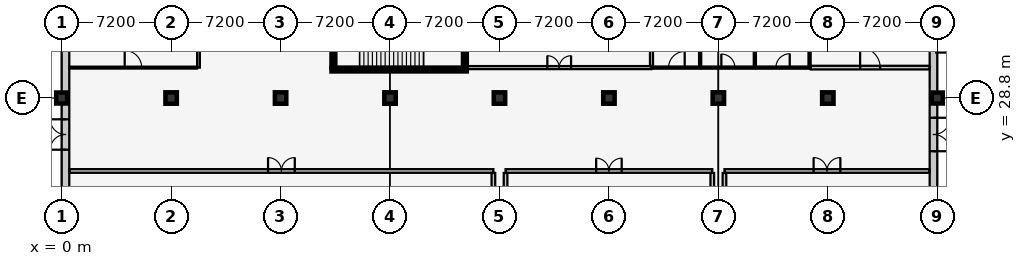
"""IFC4 building model, lengths in metres.
Left out: names, types, materials, properties, quantities, classifications, styles, units other than length and angle.
Written with IfcOpenShell. Run it as: python <this file> out.ifc"""

import sys

from ifc_helpers import new_model, si_unit, direction, frame, frame_2d, origin, origin_2d, place, context, subcontext, project, spatial, rectangle, extrude, element, fill, save


model = new_model("IFC4")
c1 = context("Model", 3, precision=1e-05, world=origin(), true_north=direction((0.0, 1.0)))
c2 = subcontext(c1, "Body", "Model", "MODEL_VIEW")
j1 = project(units=[si_unit("LENGTHUNIT", "METRE"), si_unit("PLANEANGLEUNIT", "RADIAN")], contexts=[c1])
p1 = place(None, origin())
s1 = spatial("IfcSite", under=j1, at=p1, CompositionType="ELEMENT")
p2 = place(p1, origin())
s2 = spatial("IfcBuilding", under=s1, at=p2, CompositionType="ELEMENT")
p3 = place(p2, origin())
s3 = spatial("IfcBuildingStorey", under=s2, at=p3, CompositionType="ELEMENT", Elevation=0.0)
p4 = place(p3, frame((0.0, 28.8, 0.0), z_axis=(0.0, 0.0, 1.0), x_axis=(1.0, 0.0, 0.0)))
e1 = element("IfcColumn", 1, at=p4, inside=s3, PredefinedType="COLUMN", context=c2, shape_type="SweptSolid", body=[
    extrude(rectangle(XDim=0.72, YDim=0.72, at=origin_2d()), origin(), (0.0, 0.0, 1.0), 5.4),
])
for number, where, z_axis, x_axis in (
    (2, (7.2, 28.8, 0.0), (0.0, 0.0, 1.0), (1.0, 0.0, 0.0)),
    (3, (14.4, 28.8, 0.0), (0.0, 0.0, 1.0), (1.0, 0.0, 0.0)),
    (4, (21.6, 28.8, 0.0), (0.0, 0.0, 1.0), (1.0, 0.0, 0.0)),
    (5, (28.8, 28.8, 0.0), (0.0, 0.0, 1.0), (1.0, 0.0, 0.0)),
    (6, (36.0, 28.8, 0.0), (0.0, 0.0, 1.0), (1.0, 0.0, 0.0)),
    (7, (43.2, 28.8, 0.0), (0.0, 0.0, 1.0), (1.0, 0.0, 0.0)),
    (8, (50.4, 28.8, 0.0), (0.0, 0.0, 1.0), (1.0, 0.0, 0.0)),
):
    element("IfcColumn", number, at=place(p3, frame(where, z_axis=z_axis, x_axis=x_axis)), inside=s3, PredefinedType="COLUMN", context=c2, shape_type="SweptSolid", body=[
        extrude(rectangle(XDim=0.75, YDim=0.75, at=origin_2d()), origin(), (0.0, 0.0, 1.0), 5.4),
    ])
p5 = place(p3, frame((57.6, 28.8, 0.0), z_axis=(0.0, 0.0, 1.0), x_axis=(1.0, 0.0, 0.0)))
e9 = element("IfcColumn", 9, at=p5, inside=s3, PredefinedType="COLUMN", context=c2, shape_type="SweptSolid", body=[
    extrude(rectangle(XDim=0.72, YDim=0.72, at=origin_2d()), origin(), (0.0, 0.0, 1.0), 5.4),
])
p6 = place(p3, frame((57.35, 38.4, 0.0), z_axis=(0.0, 0.0, 1.0), x_axis=(0.0, -1.0, 0.0)))
e10 = element("IfcWall", 10, at=p6, inside=s3, PredefinedType="SOLIDWALL", context=c2, shape_type="SweptSolid", body=[
    extrude(rectangle(XDim=38.4, YDim=0.5, at=frame_2d((19.2, 0.0))), origin(), (0.0, 0.0, 1.0), 4.255),
])
p7 = place(p6, frame((10.9, 0.0, 0.0)))
e11 = element("IfcOpeningElement", 11, at=p7, cuts=e10, PredefinedType="OPENING", context=c2, shape_type="SweptSolid", body=[
    extrude(rectangle(XDim=2.2, YDim=2.4, at=frame_2d((1.1, 1.2))), frame((0.0, 0.262, 0.0), z_axis=(0.0, -1.0, 0.0), x_axis=(1.0, 0.0, 0.0)), (0.0, 0.0, 1.0), 0.524),
])
p8 = place(p6, frame((1.345, 0.0, 0.9)))
e12 = element("IfcOpeningElement", 12, at=p8, cuts=e10, PredefinedType="OPENING", context=c2, shape_type="SweptSolid", body=[
    extrude(rectangle(XDim=1.15, YDim=1.45, at=frame_2d((0.575, 0.725))), frame((0.0, 0.262, 0.0), z_axis=(0.0, -1.0, 0.0), x_axis=(1.0, 0.0, 0.0)), (0.0, 0.0, 1.0), 0.524),
])
p9 = place(p6, frame((5.135, 0.0, 0.9)))
e13 = element("IfcOpeningElement", 13, at=p9, cuts=e10, PredefinedType="OPENING", context=c2, shape_type="SweptSolid", body=[
    extrude(rectangle(XDim=1.25, YDim=1.45, at=frame_2d((0.625, 0.725))), frame((0.0, 0.262, 0.0), z_axis=(0.0, -1.0, 0.0), x_axis=(1.0, 0.0, 0.0)), (0.0, 0.0, 1.0), 0.524),
])
p10 = place(p6, frame((20.595, 0.0, 0.9)))
e14 = element("IfcOpeningElement", 14, at=p10, cuts=e10, PredefinedType="OPENING", context=c2, shape_type="SweptSolid", body=[
    extrude(rectangle(XDim=1.05, YDim=1.6, at=frame_2d((0.525, 0.8))), frame((0.0, 0.262, 0.0), z_axis=(0.0, -1.0, 0.0), x_axis=(1.0, 0.0, 0.0)), (0.0, 0.0, 1.0), 0.524),
])
p11 = place(p6, frame((28.175, 0.0, 0.9)))
e15 = element("IfcOpeningElement", 15, at=p11, cuts=e10, PredefinedType="OPENING", context=c2, shape_type="SweptSolid", body=[
    extrude(rectangle(XDim=1.25, YDim=1.6, at=frame_2d((0.625, 0.8))), frame((0.0, 0.262, 0.0), z_axis=(0.0, -1.0, 0.0), x_axis=(1.0, 0.0, 0.0)), (0.0, 0.0, 1.0), 0.524),
])
p12 = place(p6, frame((35.73, 0.0, 0.9)))
e16 = element("IfcOpeningElement", 16, at=p12, cuts=e10, PredefinedType="OPENING", context=c2, shape_type="SweptSolid", body=[
    extrude(rectangle(XDim=1.5, YDim=1.6, at=frame_2d((0.75, 0.8))), frame((0.0, 0.262, 0.0), z_axis=(0.0, -1.0, 0.0), x_axis=(1.0, 0.0, 0.0)), (0.0, 0.0, 1.0), 0.524),
])
p13 = place(p3, frame((0.25, 0.0, 0.0), z_axis=(0.0, 0.0, 1.0), x_axis=(0.0, 1.0, 0.0)))
e17 = element("IfcWall", 17, at=p13, inside=s3, PredefinedType="SOLIDWALL", context=c2, shape_type="SweptSolid", body=[
    extrude(rectangle(XDim=38.4, YDim=0.5, at=frame_2d((19.2, 0.0))), origin(), (0.0, 0.0, 1.0), 4.255),
])
p14 = place(p13, frame((25.4, 0.0, 0.0)))
e18 = element("IfcOpeningElement", 18, at=p14, cuts=e17, PredefinedType="OPENING", context=c2, shape_type="SweptSolid", body=[
    extrude(rectangle(XDim=2.0, YDim=2.35, at=frame_2d((1.0, 1.175))), frame((0.0, 0.262, 0.0), z_axis=(0.0, -1.0, 0.0), x_axis=(1.0, 0.0, 0.0)), (0.0, 0.0, 1.0), 0.524),
])
p15 = place(p13, frame((1.245, 0.0, 0.9)))
e19 = element("IfcOpeningElement", 19, at=p15, cuts=e17, PredefinedType="OPENING", context=c2, shape_type="SweptSolid", body=[
    extrude(rectangle(XDim=1.35, YDim=1.45, at=frame_2d((0.675, 0.725))), frame((0.0, 0.262, 0.0), z_axis=(0.0, -1.0, 0.0), x_axis=(1.0, 0.0, 0.0)), (0.0, 0.0, 1.0), 0.524),
])
p16 = place(p13, frame((9.15, 0.0, 0.9)))
e20 = element("IfcOpeningElement", 20, at=p16, cuts=e17, PredefinedType="OPENING", context=c2, shape_type="SweptSolid", body=[
    extrude(rectangle(XDim=0.9, YDim=1.6, at=frame_2d((0.45, 0.8))), frame((0.0, 0.262, 0.0), z_axis=(0.0, -1.0, 0.0), x_axis=(1.0, 0.0, 0.0)), (0.0, 0.0, 1.0), 0.524),
])
p17 = place(p13, frame((16.705, 0.0, 0.9)))
e21 = element("IfcOpeningElement", 21, at=p17, cuts=e17, PredefinedType="OPENING", context=c2, shape_type="SweptSolid", body=[
    extrude(rectangle(XDim=1.15, YDim=1.6, at=frame_2d((0.575, 0.8))), frame((0.0, 0.262, 0.0), z_axis=(0.0, -1.0, 0.0), x_axis=(1.0, 0.0, 0.0)), (0.0, 0.0, 1.0), 0.524),
])
p18 = place(p13, frame((32.14, 0.0, 0.9)))
e22 = element("IfcOpeningElement", 22, at=p18, cuts=e17, PredefinedType="OPENING", context=c2, shape_type="SweptSolid", body=[
    extrude(rectangle(XDim=1.0, YDim=1.75, at=frame_2d((0.5, 0.875))), frame((0.0, 0.262, 0.0), z_axis=(0.0, -1.0, 0.0), x_axis=(1.0, 0.0, 0.0)), (0.0, 0.0, 1.0), 0.524),
])
p19 = place(p13, frame((35.92, 0.0, 0.9)))
e23 = element("IfcOpeningElement", 23, at=p19, cuts=e17, PredefinedType="OPENING", context=c2, shape_type="SweptSolid", body=[
    extrude(rectangle(XDim=1.12, YDim=1.75, at=frame_2d((0.56, 0.875))), frame((0.0, 0.262, 0.0), z_axis=(0.0, -1.0, 0.0), x_axis=(1.0, 0.0, 0.0)), (0.0, 0.0, 1.0), 0.524),
])
p20 = place(p3, frame((17.75, 30.675, 0.0), z_axis=(0.0, 0.0, 1.0), x_axis=(1.0, 0.0, 0.0)))
e24 = element("IfcWall", 24, at=p20, inside=s3, PredefinedType="SHEAR", context=c2, shape_type="SweptSolid", body=[
    extrude(rectangle(XDim=8.9, YDim=0.25, at=frame_2d((4.45, 0.0))), origin(), (0.0, 0.0, 1.0), 5.1),
])
p21 = place(p3, frame((17.875, 34.25, 0.0), z_axis=(0.0, 0.0, 1.0), x_axis=(0.0, -1.0, 0.0)))
e25 = element("IfcWall", 25, at=p21, inside=s3, PredefinedType="SHEAR", context=c2, shape_type="SweptSolid", body=[
    extrude(rectangle(XDim=3.45, YDim=0.25, at=frame_2d((1.725, 0.0))), origin(), (0.0, 0.0, 1.0), 5.1),
])
p22 = place(p21, frame((1.125, 0.0, 0.0)))
e26 = element("IfcOpeningElement", 26, at=p22, cuts=e25, PredefinedType="OPENING", context=c2, shape_type="SweptSolid", body=[
    extrude(rectangle(XDim=1.2, YDim=2.15, at=frame_2d((0.6, 1.075))), frame((0.0, 0.137, 0.0), z_axis=(0.0, -1.0, 0.0), x_axis=(1.0, 0.0, 0.0)), (0.0, 0.0, 1.0), 0.274),
])
p23 = place(p3, frame((26.525, 30.8, 0.0), z_axis=(0.0, 0.0, 1.0), x_axis=(0.0, 1.0, 0.0)))
e27 = element("IfcWall", 27, at=p23, inside=s3, PredefinedType="SHEAR", context=c2, shape_type="SweptSolid", body=[
    extrude(rectangle(XDim=3.45, YDim=0.25, at=frame_2d((1.725, 0.0))), origin(), (0.0, 0.0, 1.0), 5.1),
])
p24 = place(p3, frame((0.51, 24.0, 0.0), z_axis=(0.0, 0.0, 1.0), x_axis=(1.0, 0.0, 0.0)))
e28 = element("IfcWall", 28, at=p24, inside=s3, PredefinedType="PARTITIONING", context=c2, shape_type="SweptSolid", body=[
    extrude(rectangle(XDim=27.89, YDim=0.24, at=frame_2d((13.945, 0.0))), origin(), (0.0, 0.0, 1.0), 5.15),
])
p25 = place(p24, frame((13.065, 0.0, 0.0)))
e29 = element("IfcOpeningElement", 29, at=p25, cuts=e28, PredefinedType="OPENING", context=c2, shape_type="SweptSolid", body=[
    extrude(rectangle(XDim=1.76, YDim=2.3, at=frame_2d((0.88, 1.15))), frame((0.0, 0.132, 0.0), z_axis=(0.0, -1.0, 0.0), x_axis=(1.0, 0.0, 0.0)), (0.0, 0.0, 1.0), 0.264),
])
p26 = place(p3, frame((28.4, 0.47, 0.0), z_axis=(0.0, 0.0, 1.0), x_axis=(0.0, 1.0, 0.0)))
e30 = element("IfcWall", 30, at=p26, inside=s3, PredefinedType="PARTITIONING", context=c2, shape_type="SweptSolid", body=[
    extrude(rectangle(XDim=23.4, YDim=0.24, at=frame_2d((11.7, 0.0))), origin(), (0.0, 0.0, 1.0), 5.15),
])
p27 = place(p3, frame((29.2, 24.0, 0.0), z_axis=(0.0, 0.0, 1.0), x_axis=(1.0, 0.0, 0.0)))
e31 = element("IfcWall", 31, at=p27, inside=s3, PredefinedType="PARTITIONING", context=c2, shape_type="SweptSolid", body=[
    extrude(rectangle(XDim=13.6, YDim=0.24, at=frame_2d((6.8, 0.0))), origin(), (0.0, 0.0, 1.0), 5.15),
])
p28 = place(p27, frame((5.96, 0.0, 0.0)))
e32 = element("IfcOpeningElement", 32, at=p28, cuts=e31, PredefinedType="OPENING", context=c2, shape_type="SweptSolid", body=[
    extrude(rectangle(XDim=1.68, YDim=2.3, at=frame_2d((0.84, 1.15))), frame((0.0, 0.132, 0.0), z_axis=(0.0, -1.0, 0.0), x_axis=(1.0, 0.0, 0.0)), (0.0, 0.0, 1.0), 0.264),
])
for number, where, z_axis, x_axis in (
    (33, (29.2, 0.47, 0.0), (0.0, 0.0, 1.0), (0.0, 1.0, 0.0)),
    (34, (42.8, 0.47, 0.0), (0.0, 0.0, 1.0), (0.0, 1.0, 0.0)),
):
    element("IfcWall", number, at=place(p3, frame(where, z_axis=z_axis, x_axis=x_axis)), inside=s3, PredefinedType="PARTITIONING", context=c2, shape_type="SweptSolid", body=[
        extrude(rectangle(XDim=23.4, YDim=0.24, at=frame_2d((11.7, 0.0))), origin(), (0.0, 0.0, 1.0), 5.15),
    ])
p29 = place(p3, frame((43.6, 24.0, 0.0), z_axis=(0.0, 0.0, 1.0), x_axis=(1.0, 0.0, 0.0)))
e35 = element("IfcWall", 35, at=p29, inside=s3, PredefinedType="PARTITIONING", context=c2, shape_type="SweptSolid", body=[
    extrude(rectangle(XDim=13.49, YDim=0.24, at=frame_2d((6.745, 0.0))), origin(), (0.0, 0.0, 1.0), 5.15),
])
p30 = place(p29, frame((5.865, 0.0, 0.0)))
e36 = element("IfcOpeningElement", 36, at=p30, cuts=e35, PredefinedType="OPENING", context=c2, shape_type="SweptSolid", body=[
    extrude(rectangle(XDim=1.76, YDim=2.3, at=frame_2d((0.88, 1.15))), frame((0.0, 0.132, 0.0), z_axis=(0.0, -1.0, 0.0), x_axis=(1.0, 0.0, 0.0)), (0.0, 0.0, 1.0), 0.264),
])
p31 = place(p3, frame((43.6, 16.11, 0.0), z_axis=(0.0, 0.0, 1.0), x_axis=(0.0, 1.0, 0.0)))
e37 = element("IfcWall", 37, at=p31, inside=s3, PredefinedType="PARTITIONING", context=c2, shape_type="SweptSolid", body=[
    extrude(rectangle(XDim=7.76, YDim=0.24, at=frame_2d((3.88, 0.0))), origin(), (0.0, 0.0, 1.0), 5.15),
])
p32 = place(p3, frame((9.0, 30.8, 0.0), z_axis=(0.0, 0.0, 1.0), x_axis=(0.0, 1.0, 0.0)))
e38 = element("IfcWall", 38, at=p32, inside=s3, PredefinedType="PARTITIONING", context=c2, shape_type="SweptSolid", body=[
    extrude(rectangle(XDim=7.09, YDim=0.18, at=frame_2d((3.545, 0.0))), origin(), (0.0, 0.0, 1.0), 5.1),
])
p33 = place(p3, frame((0.51, 30.8, 0.0), z_axis=(0.0, 0.0, 1.0), x_axis=(1.0, 0.0, 0.0)))
e39 = element("IfcWall", 39, at=p33, inside=s3, PredefinedType="PARTITIONING", context=c2, shape_type="SweptSolid", body=[
    extrude(rectangle(XDim=8.39, YDim=0.125, at=frame_2d((4.195, 0.0))), origin(), (0.0, 0.0, 1.0), 5.1),
])
p34 = place(p33, frame((3.635, 0.0, 0.0)))
e40 = element("IfcOpeningElement", 40, at=p34, cuts=e39, PredefinedType="OPENING", context=c2, shape_type="SweptSolid", body=[
    extrude(rectangle(XDim=1.12, YDim=2.15, at=frame_2d((0.56, 1.075))), frame((0.0, 0.074, 0.0), z_axis=(0.0, -1.0, 0.0), x_axis=(1.0, 0.0, 0.0)), (0.0, 0.0, 1.0), 0.149),
])
p35 = place(p3, frame((26.66, 30.8, 0.0), z_axis=(0.0, 0.0, 1.0), x_axis=(1.0, 0.0, 0.0)))
e41 = element("IfcWall", 41, at=p35, inside=s3, PredefinedType="PARTITIONING", context=c2, shape_type="SweptSolid", body=[
    extrude(rectangle(XDim=12.14, YDim=0.2, at=frame_2d((6.07, 0.0))), origin(), (0.0, 0.0, 1.0), 5.1),
])
p36 = place(p35, frame((5.29, 0.0, 0.0)))
e42 = element("IfcOpeningElement", 42, at=p36, cuts=e41, PredefinedType="OPENING", context=c2, shape_type="SweptSolid", body=[
    extrude(rectangle(XDim=1.56, YDim=2.25, at=frame_2d((0.78, 1.125))), frame((0.0, 0.112, 0.0), z_axis=(0.0, -1.0, 0.0), x_axis=(1.0, 0.0, 0.0)), (0.0, 0.0, 1.0), 0.224),
])
p37 = place(p3, frame((38.8, 30.91, 0.0), z_axis=(0.0, 0.0, 1.0), x_axis=(0.0, 1.0, 0.0)))
e43 = element("IfcWall", 43, at=p37, inside=s3, PredefinedType="PARTITIONING", context=c2, shape_type="SweptSolid", body=[
    extrude(rectangle(XDim=6.98, YDim=0.2, at=frame_2d((3.49, 0.0))), origin(), (0.0, 0.0, 1.0), 5.1),
])
p38 = place(p3, frame((38.91, 30.8, 0.0), z_axis=(0.0, 0.0, 1.0), x_axis=(1.0, 0.0, 0.0)))
e44 = element("IfcWall", 44, at=p38, inside=s3, PredefinedType="PARTITIONING", context=c2, shape_type="SweptSolid", body=[
    extrude(rectangle(XDim=3.09, YDim=0.14, at=frame_2d((1.545, 0.0))), origin(), (0.0, 0.0, 1.0), 5.1),
])
p39 = place(p38, frame((1.015, 0.0, 0.0)))
e45 = element("IfcOpeningElement", 45, at=p39, cuts=e44, PredefinedType="OPENING", context=c2, shape_type="SweptSolid", body=[
    extrude(rectangle(XDim=1.06, YDim=2.1, at=frame_2d((0.53, 1.05))), frame((0.0, 0.082, 0.0), z_axis=(0.0, -1.0, 0.0), x_axis=(1.0, 0.0, 0.0)), (0.0, 0.0, 1.0), 0.164),
])
p40 = place(p3, frame((42.0, 30.88, 0.0), z_axis=(0.0, 0.0, 1.0), x_axis=(0.0, 1.0, 0.0)))
e46 = element("IfcWall", 46, at=p40, inside=s3, PredefinedType="PARTITIONING", context=c2, shape_type="SweptSolid", body=[
    extrude(rectangle(XDim=7.01, YDim=0.14, at=frame_2d((3.505, 0.0))), origin(), (0.0, 0.0, 1.0), 5.1),
])
p41 = place(p3, frame((42.08, 30.8, 0.0), z_axis=(0.0, 0.0, 1.0), x_axis=(1.0, 0.0, 0.0)))
e47 = element("IfcWall", 47, at=p41, inside=s3, PredefinedType="PARTITIONING", context=c2, shape_type="SweptSolid", body=[
    extrude(rectangle(XDim=3.52, YDim=0.14, at=frame_2d((1.76, 0.0))), origin(), (0.0, 0.0, 1.0), 5.1),
])
p42 = place(p41, frame((1.315, 0.0, 0.0)))
e48 = element("IfcOpeningElement", 48, at=p42, cuts=e47, PredefinedType="OPENING", context=c2, shape_type="SweptSolid", body=[
    extrude(rectangle(XDim=0.89, YDim=2.05, at=frame_2d((0.445, 1.025))), frame((0.0, 0.082, 0.0), z_axis=(0.0, -1.0, 0.0), x_axis=(1.0, 0.0, 0.0)), (0.0, 0.0, 1.0), 0.164),
])
p43 = place(p3, frame((45.6, 30.88, 0.0), z_axis=(0.0, 0.0, 1.0), x_axis=(0.0, 1.0, 0.0)))
e49 = element("IfcWall", 49, at=p43, inside=s3, PredefinedType="PARTITIONING", context=c2, shape_type="SweptSolid", body=[
    extrude(rectangle(XDim=7.01, YDim=0.14, at=frame_2d((3.505, 0.0))), origin(), (0.0, 0.0, 1.0), 5.1),
])
p44 = place(p3, frame((45.68, 30.8, 0.0), z_axis=(0.0, 0.0, 1.0), x_axis=(1.0, 0.0, 0.0)))
e50 = element("IfcWall", 50, at=p44, inside=s3, PredefinedType="PARTITIONING", context=c2, shape_type="SweptSolid", body=[
    extrude(rectangle(XDim=3.52, YDim=0.14, at=frame_2d((1.76, 0.0))), origin(), (0.0, 0.0, 1.0), 5.1),
])
p45 = place(p44, frame((1.305, 0.0, 0.0)))
e51 = element("IfcOpeningElement", 51, at=p45, cuts=e50, PredefinedType="OPENING", context=c2, shape_type="SweptSolid", body=[
    extrude(rectangle(XDim=0.91, YDim=2.06, at=frame_2d((0.455, 1.03))), frame((0.0, 0.082, 0.0), z_axis=(0.0, -1.0, 0.0), x_axis=(1.0, 0.0, 0.0)), (0.0, 0.0, 1.0), 0.164),
])
p46 = place(p3, frame((49.2, 30.88, 0.0), z_axis=(0.0, 0.0, 1.0), x_axis=(0.0, 1.0, 0.0)))
e52 = element("IfcWall", 52, at=p46, inside=s3, PredefinedType="PARTITIONING", context=c2, shape_type="SweptSolid", body=[
    extrude(rectangle(XDim=7.01, YDim=0.14, at=frame_2d((3.505, 0.0))), origin(), (0.0, 0.0, 1.0), 5.1),
])
p47 = place(p3, frame((49.28, 30.8, 0.0), z_axis=(0.0, 0.0, 1.0), x_axis=(1.0, 0.0, 0.0)))
e53 = element("IfcWall", 53, at=p47, inside=s3, PredefinedType="PARTITIONING", context=c2, shape_type="SweptSolid", body=[
    extrude(rectangle(XDim=7.81, YDim=0.24, at=frame_2d((3.905, 0.0))), origin(), (0.0, 0.0, 1.0), 5.1),
])
p48 = place(p47, frame((3.245, 0.0, 0.0)))
e54 = element("IfcOpeningElement", 54, at=p48, cuts=e53, PredefinedType="OPENING", context=c2, shape_type="SweptSolid", body=[
    extrude(rectangle(XDim=1.32, YDim=2.15, at=frame_2d((0.66, 1.075))), frame((0.0, 0.132, 0.0), z_axis=(0.0, -1.0, 0.0), x_axis=(1.0, 0.0, 0.0)), (0.0, 0.0, 1.0), 0.264),
])
p49 = place(p7, origin())
e55 = element("IfcDoor", 55, at=p49, inside=s3, OperationType="DOUBLE_DOOR_SINGLE_SWING", PredefinedType="DOOR", context=c2, shape_type="SweptSolid", body=[
    extrude(rectangle(XDim=2.2, YDim=2.4, at=frame_2d((1.1, 1.2))), frame((0.0, 0.025, 0.0), z_axis=(0.0, -1.0, 0.0), x_axis=(1.0, 0.0, 0.0)), (0.0, 0.0, 1.0), 0.05),
])
fill(e11, e55)
p50 = place(p14, origin())
e56 = element("IfcDoor", 56, at=p50, inside=s3, OperationType="DOUBLE_DOOR_SINGLE_SWING", PredefinedType="DOOR", context=c2, shape_type="SweptSolid", body=[
    extrude(rectangle(XDim=2.0, YDim=2.35, at=frame_2d((1.0, 1.175))), frame((0.0, 0.025, 0.0), z_axis=(0.0, -1.0, 0.0), x_axis=(1.0, 0.0, 0.0)), (0.0, 0.0, 1.0), 0.05),
])
fill(e18, e56)
p51 = place(p25, origin())
e57 = element("IfcDoor", 57, at=p51, inside=s3, OperationType="DOUBLE_DOOR_SINGLE_SWING", PredefinedType="DOOR", context=c2, shape_type="SweptSolid", body=[
    extrude(rectangle(XDim=1.76, YDim=2.3, at=frame_2d((0.88, 1.15))), frame((0.0, 0.025, 0.0), z_axis=(0.0, -1.0, 0.0), x_axis=(1.0, 0.0, 0.0)), (0.0, 0.0, 1.0), 0.05),
])
fill(e29, e57)
p52 = place(p28, origin())
e58 = element("IfcDoor", 58, at=p52, inside=s3, OperationType="DOUBLE_DOOR_SINGLE_SWING", PredefinedType="DOOR", context=c2, shape_type="SweptSolid", body=[
    extrude(rectangle(XDim=1.68, YDim=2.3, at=frame_2d((0.84, 1.15))), frame((0.0, 0.025, 0.0), z_axis=(0.0, -1.0, 0.0), x_axis=(1.0, 0.0, 0.0)), (0.0, 0.0, 1.0), 0.05),
])
fill(e32, e58)
p53 = place(p30, origin())
e59 = element("IfcDoor", 59, at=p53, inside=s3, OperationType="DOUBLE_DOOR_SINGLE_SWING", PredefinedType="DOOR", context=c2, shape_type="SweptSolid", body=[
    extrude(rectangle(XDim=1.76, YDim=2.3, at=frame_2d((0.88, 1.15))), frame((0.0, 0.025, 0.0), z_axis=(0.0, -1.0, 0.0), x_axis=(1.0, 0.0, 0.0)), (0.0, 0.0, 1.0), 0.05),
])
fill(e36, e59)
p54 = place(p34, origin())
e60 = element("IfcDoor", 60, at=p54, inside=s3, OperationType="SINGLE_SWING_LEFT", PredefinedType="DOOR", context=c2, shape_type="SweptSolid", body=[
    extrude(rectangle(XDim=1.12, YDim=2.15, at=frame_2d((0.56, 1.075))), frame((0.0, 0.025, 0.0), z_axis=(0.0, -1.0, 0.0), x_axis=(1.0, 0.0, 0.0)), (0.0, 0.0, 1.0), 0.05),
])
fill(e40, e60)
p55 = place(p36, origin())
e61 = element("IfcDoor", 61, at=p55, inside=s3, OperationType="DOUBLE_DOOR_SINGLE_SWING", PredefinedType="DOOR", context=c2, shape_type="SweptSolid", body=[
    extrude(rectangle(XDim=1.56, YDim=2.25, at=frame_2d((0.78, 1.125))), frame((0.0, 0.025, 0.0), z_axis=(0.0, -1.0, 0.0), x_axis=(1.0, 0.0, 0.0)), (0.0, 0.0, 1.0), 0.05),
])
fill(e42, e61)
p56 = place(p39, origin())
e62 = element("IfcDoor", 62, at=p56, inside=s3, OperationType="SINGLE_SWING_RIGHT", PredefinedType="DOOR", context=c2, shape_type="SweptSolid", body=[
    extrude(rectangle(XDim=1.06, YDim=2.1, at=frame_2d((0.53, 1.05))), frame((0.0, 0.025, 0.0), z_axis=(0.0, -1.0, 0.0), x_axis=(1.0, 0.0, 0.0)), (0.0, 0.0, 1.0), 0.05),
])
fill(e45, e62)
p57 = place(p42, origin())
e63 = element("IfcDoor", 63, at=p57, inside=s3, OperationType="SINGLE_SWING_LEFT", PredefinedType="DOOR", context=c2, shape_type="SweptSolid", body=[
    extrude(rectangle(XDim=0.89, YDim=2.05, at=frame_2d((0.445, 1.025))), frame((0.0, 0.025, 0.0), z_axis=(0.0, -1.0, 0.0), x_axis=(1.0, 0.0, 0.0)), (0.0, 0.0, 1.0), 0.05),
])
fill(e48, e63)
p58 = place(p45, origin())
e64 = element("IfcDoor", 64, at=p58, inside=s3, OperationType="SINGLE_SWING_RIGHT", PredefinedType="DOOR", context=c2, shape_type="SweptSolid", body=[
    extrude(rectangle(XDim=0.91, YDim=2.06, at=frame_2d((0.455, 1.03))), frame((0.0, 0.025, 0.0), z_axis=(0.0, -1.0, 0.0), x_axis=(1.0, 0.0, 0.0)), (0.0, 0.0, 1.0), 0.05),
])
fill(e51, e64)
p59 = place(p48, origin())
e65 = element("IfcDoor", 65, at=p59, inside=s3, OperationType="SINGLE_SWING_LEFT", PredefinedType="DOOR", context=c2, shape_type="SweptSolid", body=[
    extrude(rectangle(XDim=1.32, YDim=2.15, at=frame_2d((0.66, 1.075))), frame((0.0, 0.025, 0.0), z_axis=(0.0, -1.0, 0.0), x_axis=(1.0, 0.0, 0.0)), (0.0, 0.0, 1.0), 0.05),
])
fill(e54, e65)
save(model, sys.argv[1])
